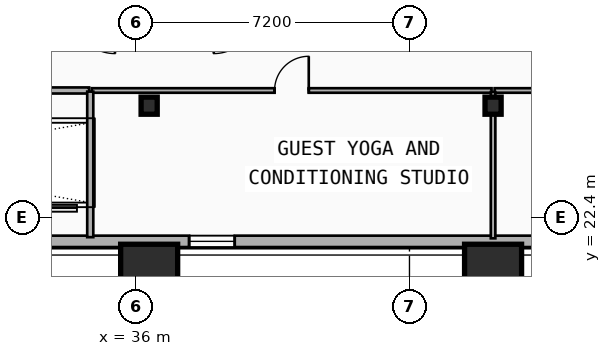
"""IFC4 building model, lengths in metres.
Left out: names, types, materials, properties, quantities, classifications, styles, units other than length and angle.
Written with IfcOpenShell. Run it as: python <this file> out.ifc"""

import sys

from ifc_helpers import new_model, si_unit, direction, frame, frame_2d, origin, origin_2d, place, context, subcontext, project, spatial, rectangle, i_section, extrude, element, fill, save


model = new_model("IFC4")
c1 = context("Model", 3, precision=1e-05, world=origin(), true_north=direction((0.0, 1.0)))
c2 = subcontext(c1, "Body", "Model", "MODEL_VIEW")
j1 = project(units=[si_unit("LENGTHUNIT", "METRE"), si_unit("PLANEANGLEUNIT", "RADIAN")], contexts=[c1])
p1 = place(None, origin())
s1 = spatial("IfcSite", under=j1, at=p1, CompositionType="ELEMENT")
p2 = place(p1, origin())
s2 = spatial("IfcBuilding", under=s1, at=p2, CompositionType="ELEMENT")
p3 = place(p2, frame((0.0, 0.0, 57.0)))
s3 = spatial("IfcBuildingStorey", under=s2, at=p3, CompositionType="ELEMENT", Elevation=57.0)
for number, where, z_axis, x_axis in (
    (1, (36.35, 25.35, 0.0), (0.0, 0.0, 1.0), (1.0, 0.0, 0.0)),
    (2, (45.4, 25.35, 0.0), (0.0, 0.0, 1.0), (1.0, 0.0, 0.0)),
):
    element("IfcColumn", number, at=place(p3, frame(where, z_axis=z_axis, x_axis=x_axis)), inside=s3, PredefinedType="COLUMN", context=c2, shape_type="SweptSolid", body=[
        extrude(i_section(OverallWidth=0.424, OverallDepth=0.45, WebThickness=0.041, FlangeThickness=0.065, FilletRadius=0.015, at=origin_2d()), origin(), (0.0, 0.0, 1.0), 3.5),
    ])
for number, where, z_axis, x_axis in (
    (3, (36.35, 21.062, 0.0), (0.0, -0.09, 0.996), (1.0, 0.0, 0.0)),
    (4, (45.4, 21.062, 0.0), (0.0, -0.09, 0.996), (1.0, 0.0, 0.0)),
):
    element("IfcColumn", number, at=place(p3, frame(where, z_axis=z_axis, x_axis=x_axis)), inside=s3, PredefinedType="COLUMN", context=c2, shape_type="SweptSolid", body=[
        extrude(rectangle(XDim=1.5, YDim=1.5, at=origin_2d()), origin(), (0.0, 0.0, 1.0), 3.514),
    ])
p4 = place(p3, frame((53.4, 21.78, 0.0), z_axis=(0.0, 0.0, 1.0), x_axis=(-1.0, 0.0, 0.0)))
e5 = element("IfcWall", 5, at=p4, inside=s3, PredefinedType="SOLIDWALL", context=c2, shape_type="SweptSolid", body=[
    extrude(rectangle(XDim=49.2, YDim=0.3, at=frame_2d((24.6, 0.0))), origin(), (0.0, 0.0, 1.0), 2.72),
])
p5 = place(p4, frame((43.109, 0.0, 0.74)))
e6 = element("IfcOpeningElement", 6, at=p5, cuts=e5, PredefinedType="OPENING", context=c2, shape_type="SweptSolid", body=[
    extrude(rectangle(XDim=1.8, YDim=1.8, at=frame_2d((0.9, 0.9))), frame((0.0, 0.16, 0.0), z_axis=(0.0, -1.0, 0.0), x_axis=(1.0, 0.0, 0.0)), (0.0, 0.0, 1.0), 0.32),
])
p6 = place(p4, frame((38.948, 0.0, 0.48)))
e7 = element("IfcOpeningElement", 7, at=p6, cuts=e5, PredefinedType="OPENING", context=c2, shape_type="SweptSolid", body=[
    extrude(rectangle(XDim=1.2, YDim=1.5, at=frame_2d((0.6, 0.75))), frame((0.0, 0.16, 0.0), z_axis=(0.0, -1.0, 0.0), x_axis=(1.0, 0.0, 0.0)), (0.0, 0.0, 1.0), 0.32),
])
p7 = place(p4, frame((14.798, 0.0, 0.48)))
e8 = element("IfcOpeningElement", 8, at=p7, cuts=e5, PredefinedType="OPENING", context=c2, shape_type="SweptSolid", body=[
    extrude(rectangle(XDim=1.2, YDim=1.5, at=frame_2d((0.6, 0.75))), frame((0.0, 0.16, 0.0), z_axis=(0.0, -1.0, 0.0), x_axis=(1.0, 0.0, 0.0)), (0.0, 0.0, 1.0), 0.32),
])
p8 = place(p4, frame((4.291, 0.0, 0.74)))
e9 = element("IfcOpeningElement", 9, at=p8, cuts=e5, PredefinedType="OPENING", context=c2, shape_type="SweptSolid", body=[
    extrude(rectangle(XDim=1.8, YDim=1.8, at=frame_2d((0.9, 0.9))), frame((0.0, 0.16, 0.0), z_axis=(0.0, -1.0, 0.0), x_axis=(1.0, 0.0, 0.0)), (0.0, 0.0, 1.0), 0.32),
])
p9 = place(p3, frame((34.84, 25.75, 0.0), z_axis=(0.0, 0.0, 1.0), x_axis=(1.0, 0.0, 0.0)))
e10 = element("IfcWall", 10, at=p9, inside=s3, PredefinedType="PARTITIONING", context=c2, shape_type="SweptSolid", body=[
    extrude(rectangle(XDim=10.52, YDim=0.12, at=frame_2d((5.26, 0.0))), origin(), (0.0, 0.0, 1.0), 2.31),
])
p10 = place(p9, frame((4.81, 0.0, 0.0)))
e11 = element("IfcOpeningElement", 11, at=p10, cuts=e10, PredefinedType="OPENING", context=c2, shape_type="SweptSolid", body=[
    extrude(rectangle(XDim=0.9, YDim=2.1, at=frame_2d((0.45, 1.05))), frame((0.0, 0.07, 0.0), z_axis=(0.0, -1.0, 0.0), x_axis=(1.0, 0.0, 0.0)), (0.0, 0.0, 1.0), 0.14),
])
p11 = place(p3, frame((45.44, 25.75, 0.0), z_axis=(0.0, 0.0, 1.0), x_axis=(1.0, 0.0, 0.0)))
e12 = element("IfcWall", 12, at=p11, inside=s3, PredefinedType="PARTITIONING", context=c2, shape_type="SweptSolid", body=[
    extrude(rectangle(XDim=11.9, YDim=0.12, at=frame_2d((5.95, 0.0))), origin(), (0.0, 0.0, 1.0), 2.31),
])
p12 = place(p11, frame((5.5, 0.0, 0.0)))
e13 = element("IfcOpeningElement", 13, at=p12, cuts=e12, PredefinedType="OPENING", context=c2, shape_type="SweptSolid", body=[
    extrude(rectangle(XDim=0.9, YDim=2.1, at=frame_2d((0.45, 1.05))), frame((0.0, 0.07, 0.0), z_axis=(0.0, -1.0, 0.0), x_axis=(1.0, 0.0, 0.0)), (0.0, 0.0, 1.0), 0.14),
])
p13 = place(p3, frame((45.4, 21.86, 0.0), z_axis=(0.0, 0.0, 1.0), x_axis=(0.0, 1.0, 0.0)))
e14 = element("IfcWall", 14, at=p13, inside=s3, PredefinedType="PARTITIONING", context=c2, shape_type="SweptSolid", body=[
    extrude(rectangle(XDim=3.85, YDim=0.12, at=frame_2d((1.925, 0.0))), origin(), (0.0, 0.0, 1.0), 2.31),
])
p14 = place(p3, frame((22.83, 25.75, 0.0), z_axis=(0.0, 0.0, 1.0), x_axis=(1.0, 0.0, 0.0)))
e15 = element("IfcWall", 15, at=p14, inside=s3, PredefinedType="PARTITIONING", context=c2, shape_type="SweptSolid", body=[
    extrude(rectangle(XDim=11.94, YDim=0.16, at=frame_2d((5.97, 0.0))), origin(), (0.0, 0.0, 1.0), 3.24),
])
p15 = place(p3, frame((34.8, 21.89, 0.0), z_axis=(0.0, 0.0, 1.0), x_axis=(0.0, 1.0, 0.0)))
e16 = element("IfcWall", 16, at=p15, inside=s3, PredefinedType="PARTITIONING", context=c2, shape_type="SweptSolid", body=[
    extrude(rectangle(XDim=3.83, YDim=0.16, at=frame_2d((1.915, 0.0))), origin(), (0.0, 0.0, 1.0), 2.68),
])
p16 = place(p7, origin())
e17 = element("IfcWindow", 17, at=p16, inside=s3, PartitioningType="SINGLE_PANEL", PredefinedType="WINDOW", context=c2, shape_type="SweptSolid", body=[
    extrude(rectangle(XDim=1.2, YDim=1.5, at=frame_2d((0.6, 0.75))), frame((0.0, 0.03, 0.0), z_axis=(0.0, -1.0, 0.0), x_axis=(1.0, 0.0, 0.0)), (0.0, 0.0, 1.0), 0.06),
])
fill(e8, e17)
p17 = place(p10, origin())
e18 = element("IfcDoor", 18, at=p17, inside=s3, OperationType="SINGLE_SWING_RIGHT", PredefinedType="DOOR", context=c2, shape_type="SweptSolid", body=[
    extrude(rectangle(XDim=0.9, YDim=2.1, at=frame_2d((0.45, 1.05))), frame((0.0, 0.025, 0.0), z_axis=(0.0, -1.0, 0.0), x_axis=(1.0, 0.0, 0.0)), (0.0, 0.0, 1.0), 0.05),
])
fill(e11, e18)
save(model, sys.argv[1])
